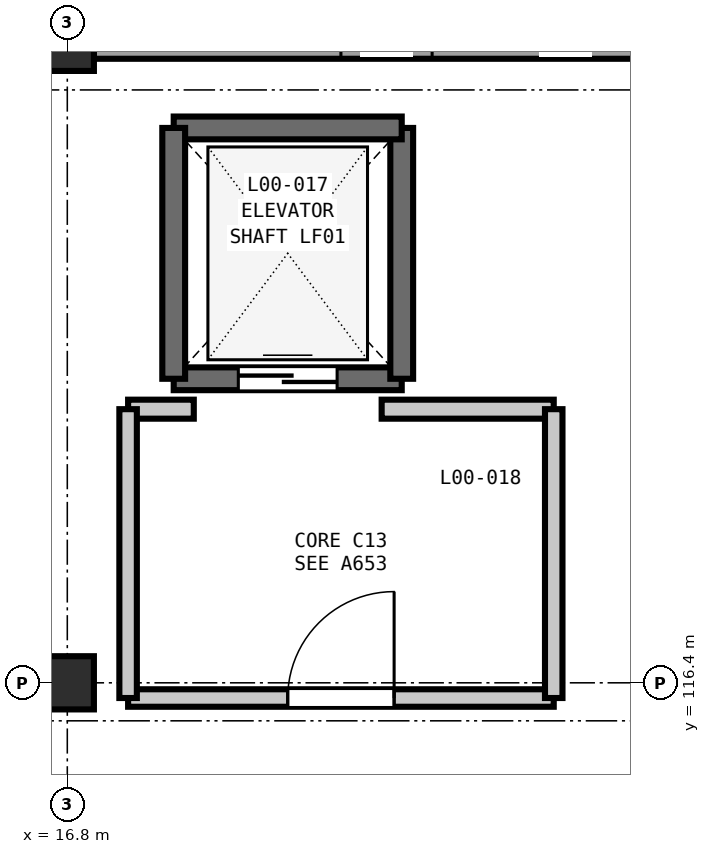
"""IFC4 building model, lengths in metres.
Left out: names, types, materials, properties, quantities, classifications, styles, units other than length and angle.
Written with IfcOpenShell. Run it as: python <this file> out.ifc"""

import sys

from ifc_helpers import new_model, si_unit, direction, frame, frame_2d, origin, origin_2d, place, context, subcontext, project, spatial, rectangle, extrude, element, fill, save


model = new_model("IFC4")
c1 = context("Model", 3, precision=1e-05, world=origin(), true_north=direction((0.0, 1.0)))
c2 = subcontext(c1, "Body", "Model", "MODEL_VIEW")
j1 = project(units=[si_unit("LENGTHUNIT", "METRE"), si_unit("PLANEANGLEUNIT", "RADIAN")], contexts=[c1])
p1 = place(None, origin())
s1 = spatial("IfcSite", under=j1, at=p1, CompositionType="ELEMENT")
p2 = place(p1, origin())
s2 = spatial("IfcBuilding", under=s1, at=p2, CompositionType="ELEMENT")
p3 = place(p2, origin())
s3 = spatial("IfcBuildingStorey", under=s2, at=p3, CompositionType="ELEMENT", Elevation=0.0)
for number, where, z_axis, x_axis in (
    (1, (16.8, 116.4, 0.0), (0.0, 0.0, 1.0), (1.0, 0.0, 0.0)),
    (2, (16.8, 124.8, 0.0), (0.0, 0.0, 1.0), (1.0, 0.0, 0.0)),
):
    element("IfcColumn", number, at=place(p3, frame(where, z_axis=z_axis, x_axis=x_axis)), inside=s3, PredefinedType="COLUMN", context=c2, shape_type="SweptSolid", body=[
        extrude(rectangle(XDim=0.7, YDim=0.7, at=origin_2d()), origin(), (0.0, 0.0, 1.0), 5.4),
    ])
p4 = place(p3, frame((17.148, 124.8, 0.0), z_axis=(0.0, 0.0, 1.0), x_axis=(1.0, 0.0, 0.0)))
e3 = element("IfcWall", 3, at=p4, inside=s3, PredefinedType="SOLIDWALL", context=c2, shape_type="SweptSolid", body=[
    extrude(rectangle(XDim=7.704, YDim=0.38, at=frame_2d((3.852, 0.0))), origin(), (0.0, 0.0, 1.0), 4.68),
])
p5 = place(p4, frame((3.252, 0.0, 0.9)))
e4 = element("IfcOpeningElement", 4, at=p5, cuts=e3, PredefinedType="OPENING", context=c2, shape_type="SweptSolid", body=[
    extrude(rectangle(XDim=1.2, YDim=1.55, at=frame_2d((0.6, 0.775))), frame((0.0, 0.2, 0.0), z_axis=(0.0, -1.0, 0.0), x_axis=(1.0, 0.0, 0.0)), (0.0, 0.0, 1.0), 0.4),
])
p6 = place(p3, frame((18.2, 120.4, 0.0), z_axis=(0.0, 0.0, 1.0), x_axis=(1.0, 0.0, 0.0)))
e5 = element("IfcWall", 5, at=p6, inside=s3, PredefinedType="SHEAR", context=c2, shape_type="SweptSolid", body=[
    extrude(rectangle(XDim=3.0, YDim=0.3, at=frame_2d((1.5, 0.0))), origin(), (0.0, 0.0, 1.0), 5.4),
])
p7 = place(p6, frame((0.85, 0.0, 0.0)))
e6 = element("IfcOpeningElement", 6, at=p7, cuts=e5, PredefinedType="OPENING", context=c2, shape_type="SweptSolid", body=[
    extrude(rectangle(XDim=1.3, YDim=2.2, at=frame_2d((0.65, 1.1))), frame((0.0, 0.16, 0.0), z_axis=(0.0, -1.0, 0.0), x_axis=(1.0, 0.0, 0.0)), (0.0, 0.0, 1.0), 0.32),
])
p8 = place(p3, frame((21.2, 120.4, 0.0), z_axis=(0.0, 0.0, 1.0), x_axis=(0.0, 1.0, 0.0)))
e7 = element("IfcWall", 7, at=p8, inside=s3, PredefinedType="SHEAR", context=c2, shape_type="SweptSolid", body=[
    extrude(rectangle(XDim=3.3, YDim=0.3, at=frame_2d((1.65, 0.0))), origin(), (0.0, 0.0, 1.0), 5.4),
])
p9 = place(p3, frame((21.2, 123.7, 0.0), z_axis=(0.0, 0.0, 1.0), x_axis=(-1.0, 0.0, 0.0)))
e8 = element("IfcWall", 8, at=p9, inside=s3, PredefinedType="SHEAR", context=c2, shape_type="SweptSolid", body=[
    extrude(rectangle(XDim=3.0, YDim=0.3, at=frame_2d((1.5, 0.0))), origin(), (0.0, 0.0, 1.0), 5.4),
])
p10 = place(p3, frame((18.2, 123.7, 0.0), z_axis=(0.0, 0.0, 1.0), x_axis=(0.0, -1.0, 0.0)))
e9 = element("IfcWall", 9, at=p10, inside=s3, PredefinedType="SHEAR", context=c2, shape_type="SweptSolid", body=[
    extrude(rectangle(XDim=3.3, YDim=0.3, at=frame_2d((1.65, 0.0))), origin(), (0.0, 0.0, 1.0), 5.4),
])
p11 = place(p3, frame((17.6, 116.2, 0.0), z_axis=(0.0, 0.0, 1.0), x_axis=(1.0, 0.0, 0.0)))
e10 = element("IfcWall", 10, at=p11, inside=s3, PredefinedType="PARTITIONING", context=c2, shape_type="SweptSolid", body=[
    extrude(rectangle(XDim=5.6, YDim=0.23, at=frame_2d((2.8, 0.0))), origin(), (0.0, 0.0, 1.0), 4.635),
])
p12 = place(p11, frame((2.1, 0.0, 0.0)))
e11 = element("IfcOpeningElement", 11, at=p12, cuts=e10, PredefinedType="OPENING", context=c2, shape_type="SweptSolid", body=[
    extrude(rectangle(XDim=1.4, YDim=2.2, at=frame_2d((0.7, 1.1))), frame((0.0, 0.125, 0.0), z_axis=(0.0, -1.0, 0.0), x_axis=(1.0, 0.0, 0.0)), (0.0, 0.0, 1.0), 0.25),
])
p13 = place(p3, frame((20.936, 120.0, 0.0), z_axis=(0.0, 0.0, 1.0), x_axis=(1.0, 0.0, 0.0)))
e12 = element("IfcWall", 12, at=p13, inside=s3, PredefinedType="PARTITIONING", context=c2, shape_type="SweptSolid", body=[
    extrude(rectangle(XDim=2.264, YDim=0.25, at=frame_2d((1.132, 0.0))), origin(), (0.0, 0.0, 1.0), 5.04),
])
p14 = place(p3, frame((17.6, 120.0, 0.0), z_axis=(0.0, 0.0, 1.0), x_axis=(1.0, 0.0, 0.0)))
e13 = element("IfcWall", 13, at=p14, inside=s3, PredefinedType="PARTITIONING", context=c2, shape_type="SweptSolid", body=[
    extrude(rectangle(XDim=0.864, YDim=0.25, at=frame_2d((0.432, 0.0))), origin(), (0.0, 0.0, 1.0), 5.04),
])
for number, where, z_axis, x_axis in (
    (14, (17.6, 116.2, 0.0), (0.0, 0.0, 1.0), (0.0, 1.0, 0.0)),
    (15, (23.2, 116.2, 0.0), (0.0, 0.0, 1.0), (0.0, 1.0, 0.0)),
):
    element("IfcWall", number, at=place(p3, frame(where, z_axis=z_axis, x_axis=x_axis)), inside=s3, PredefinedType="PARTITIONING", context=c2, shape_type="SweptSolid", body=[
        extrude(rectangle(XDim=3.8, YDim=0.23, at=frame_2d((1.9, 0.0))), origin(), (0.0, 0.0, 1.0), 5.04),
    ])
p15 = place(p7, origin())
e16 = element("IfcDoor", 16, at=p15, inside=s3, OperationType="DOUBLE_DOOR_SLIDING", PredefinedType="DOOR", context=c2, shape_type="SweptSolid", body=[
    extrude(rectangle(XDim=1.3, YDim=2.2, at=frame_2d((0.65, 1.1))), frame((0.0, 0.025, 0.0), z_axis=(0.0, -1.0, 0.0), x_axis=(1.0, 0.0, 0.0)), (0.0, 0.0, 1.0), 0.05),
])
fill(e6, e16)
p16 = place(p12, origin())
e17 = element("IfcDoor", 17, at=p16, inside=s3, OperationType="SINGLE_SWING_RIGHT", PredefinedType="DOOR", context=c2, shape_type="SweptSolid", body=[
    extrude(rectangle(XDim=1.4, YDim=2.2, at=frame_2d((0.7, 1.1))), frame((0.0, 0.025, 0.0), z_axis=(0.0, -1.0, 0.0), x_axis=(1.0, 0.0, 0.0)), (0.0, 0.0, 1.0), 0.05),
])
fill(e11, e17)
save(model, sys.argv[1])
